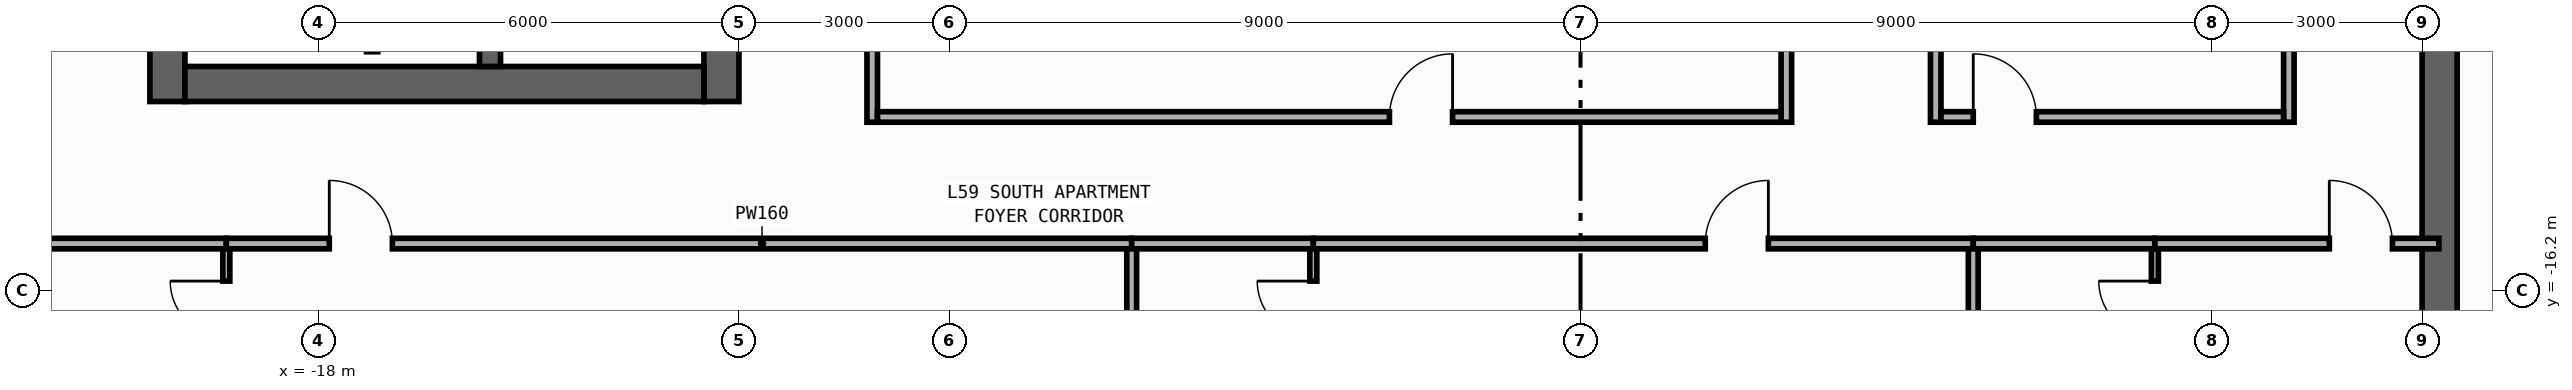
"""IFC4 building model, lengths in metres.
Left out: names, types, materials, properties, quantities, classifications, styles, units other than length and angle.
Written with IfcOpenShell. Run it as: python <this file> out.ifc"""

import sys

from ifc_helpers import new_model, si_unit, direction, frame, frame_2d, origin, place, context, subcontext, project, spatial, rectangle, extrude, element, fill, save


model = new_model("IFC4")
c1 = context("Model", 3, precision=1e-05, world=origin(), true_north=direction((0.0, 1.0)))
c2 = subcontext(c1, "Body", "Model", "MODEL_VIEW")
j1 = project(units=[si_unit("LENGTHUNIT", "METRE"), si_unit("PLANEANGLEUNIT", "RADIAN")], contexts=[c1])
p1 = place(None, origin())
s1 = spatial("IfcSite", under=j1, at=p1, CompositionType="ELEMENT")
p2 = place(p1, origin())
s2 = spatial("IfcBuilding", under=s1, at=p2, CompositionType="ELEMENT")
p3 = place(p2, frame((0.0, 0.0, 251.2)))
s3 = spatial("IfcBuildingStorey", under=s2, at=p3, CompositionType="ELEMENT", Elevation=251.2)
p4 = place(p3, frame((-20.15, -13.5, 0.0), z_axis=(0.0, 0.0, 1.0), x_axis=(0.0, 1.0, 0.0)))
e1 = element("IfcWall", 1, at=p4, inside=s3, PredefinedType="SHEAR", context=c2, shape_type="SweptSolid", body=[
    extrude(rectangle(XDim=27.0, YDim=0.5, at=frame_2d((13.5, 0.0))), origin(), (0.0, 0.0, 1.0), 3.34),
])
p5 = place(p3, frame((-12.25, -13.5, 0.0), z_axis=(0.0, 0.0, 1.0), x_axis=(0.0, 1.0, 0.0)))
e2 = element("IfcWall", 2, at=p5, inside=s3, PredefinedType="SHEAR", context=c2, shape_type="SweptSolid", body=[
    extrude(rectangle(XDim=27.0, YDim=0.5, at=frame_2d((13.5, 0.0))), origin(), (0.0, 0.0, 1.0), 3.34),
])
p6 = place(p5, frame((15.175, 0.0, 0.0)))
e3 = element("IfcOpeningElement", 3, at=p6, cuts=e2, PredefinedType="OPENING", context=c2, shape_type="SweptSolid", body=[
    extrude(rectangle(XDim=0.85, YDim=2.1, at=frame_2d((0.425, 1.05))), frame((0.0, 0.26, 0.0), z_axis=(0.0, -1.0, 0.0), x_axis=(1.0, 0.0, 0.0)), (0.0, 0.0, 1.0), 0.52),
])
p7 = place(p5, frame((21.275, 0.0, 0.0)))
e4 = element("IfcOpeningElement", 4, at=p7, cuts=e2, PredefinedType="OPENING", context=c2, shape_type="SweptSolid", body=[
    extrude(rectangle(XDim=0.85, YDim=2.1, at=frame_2d((0.425, 1.05))), frame((0.0, 0.26, 0.0), z_axis=(0.0, -1.0, 0.0), x_axis=(1.0, 0.0, 0.0)), (0.0, 0.0, 1.0), 0.52),
])
p8 = place(p5, frame((4.275, 0.0, 0.0)))
e5 = element("IfcOpeningElement", 5, at=p8, cuts=e2, PredefinedType="OPENING", context=c2, shape_type="SweptSolid", body=[
    extrude(rectangle(XDim=0.85, YDim=2.1, at=frame_2d((0.425, 1.05))), frame((0.0, 0.26, 0.0), z_axis=(0.0, -1.0, 0.0), x_axis=(1.0, 0.0, 0.0)), (0.0, 0.0, 1.0), 0.52),
])
p9 = place(p5, frame((10.275, 0.0, 0.0)))
e6 = element("IfcOpeningElement", 6, at=p9, cuts=e2, PredefinedType="OPENING", context=c2, shape_type="SweptSolid", body=[
    extrude(rectangle(XDim=0.85, YDim=2.1, at=frame_2d((0.425, 1.05))), frame((0.0, 0.26, 0.0), z_axis=(0.0, -1.0, 0.0), x_axis=(1.0, 0.0, 0.0)), (0.0, 0.0, 1.0), 0.52),
])
p10 = place(p5, frame((12.725, 0.0, 0.0)))
e7 = element("IfcOpeningElement", 7, at=p10, cuts=e2, PredefinedType="OPENING", context=c2, shape_type="SweptSolid", body=[
    extrude(rectangle(XDim=1.15, YDim=2.2, at=frame_2d((0.575, 1.1))), frame((0.0, 0.26, 0.0), z_axis=(0.0, -1.0, 0.0), x_axis=(1.0, 0.0, 0.0)), (0.0, 0.0, 1.0), 0.52),
])
p11 = place(p5, frame((1.625, 0.0, 0.0)))
e8 = element("IfcOpeningElement", 8, at=p11, cuts=e2, PredefinedType="OPENING", context=c2, shape_type="SweptSolid", body=[
    extrude(rectangle(XDim=0.85, YDim=2.1, at=frame_2d((0.425, 1.05))), frame((0.0, 0.26, 0.0), z_axis=(0.0, -1.0, 0.0), x_axis=(1.0, 0.0, 0.0)), (0.0, 0.0, 1.0), 0.52),
])
p12 = place(p3, frame((-19.9, -13.25, 0.0), z_axis=(0.0, 0.0, 1.0), x_axis=(1.0, 0.0, 0.0)))
e9 = element("IfcWall", 9, at=p12, inside=s3, PredefinedType="SHEAR", context=c2, shape_type="SweptSolid", body=[
    extrude(rectangle(XDim=7.4, YDim=0.5, at=frame_2d((3.7, 0.0))), origin(), (0.0, 0.0, 1.0), 3.34),
])
p13 = place(p3, frame((-15.55, -13.0, 0.0), z_axis=(0.0, 0.0, 1.0), x_axis=(0.0, 1.0, 0.0)))
e10 = element("IfcWall", 10, at=p13, inside=s3, PredefinedType="SHEAR", context=c2, shape_type="SweptSolid", body=[
    extrude(rectangle(XDim=26.0, YDim=0.3, at=frame_2d((13.0, 0.0))), origin(), (0.0, 0.0, 1.0), 3.34),
])
p14 = place(p13, frame((12.225, 0.0, 0.0)))
e11 = element("IfcOpeningElement", 11, at=p14, cuts=e10, PredefinedType="OPENING", context=c2, shape_type="SweptSolid", body=[
    extrude(rectangle(XDim=1.15, YDim=2.2, at=frame_2d((0.575, 1.1))), frame((0.0, 0.16, 0.0), z_axis=(0.0, -1.0, 0.0), x_axis=(1.0, 0.0, 0.0)), (0.0, 0.0, 1.0), 0.32),
])
p15 = place(p13, frame((1.125, 0.0, 0.0)))
e12 = element("IfcOpeningElement", 12, at=p15, cuts=e10, PredefinedType="OPENING", context=c2, shape_type="SweptSolid", body=[
    extrude(rectangle(XDim=0.85, YDim=2.1, at=frame_2d((0.425, 1.05))), frame((0.0, 0.16, 0.0), z_axis=(0.0, -1.0, 0.0), x_axis=(1.0, 0.0, 0.0)), (0.0, 0.0, 1.0), 0.32),
])
p16 = place(p3, frame((12.25, -19.8, 0.0), z_axis=(0.0, 0.0, 1.0), x_axis=(0.0, 1.0, 0.0)))
e13 = element("IfcWall", 13, at=p16, inside=s3, PredefinedType="SHEAR", context=c2, shape_type="SweptSolid", body=[
    extrude(rectangle(XDim=27.0, YDim=0.5, at=frame_2d((13.5, 0.0))), origin(), (0.0, 0.0, 1.0), 3.34),
])
p17 = place(p16, frame((23.05, 0.0, 0.0)))
e14 = element("IfcOpeningElement", 14, at=p17, cuts=e13, PredefinedType="OPENING", context=c2, shape_type="SweptSolid", body=[
    extrude(rectangle(XDim=1.1, YDim=2.2, at=frame_2d((0.55, 1.1))), frame((0.0, 0.26, 0.0), z_axis=(0.0, -1.0, 0.0), x_axis=(1.0, 0.0, 0.0)), (0.0, 0.0, 1.0), 0.52),
])
p18 = place(p16, frame((19.85, 0.0, 0.0)))
e15 = element("IfcOpeningElement", 15, at=p18, cuts=e13, PredefinedType="OPENING", context=c2, shape_type="SweptSolid", body=[
    extrude(rectangle(XDim=1.1, YDim=2.2, at=frame_2d((0.55, 1.1))), frame((0.0, 0.26, 0.0), z_axis=(0.0, -1.0, 0.0), x_axis=(1.0, 0.0, 0.0)), (0.0, 0.0, 1.0), 0.52),
])
p19 = place(p16, frame((16.65, 0.0, 0.0)))
e16 = element("IfcOpeningElement", 16, at=p19, cuts=e13, PredefinedType="OPENING", context=c2, shape_type="SweptSolid", body=[
    extrude(rectangle(XDim=1.1, YDim=2.2, at=frame_2d((0.55, 1.1))), frame((0.0, 0.26, 0.0), z_axis=(0.0, -1.0, 0.0), x_axis=(1.0, 0.0, 0.0)), (0.0, 0.0, 1.0), 0.52),
])
p20 = place(p16, frame((10.175, 0.0, 0.0)))
e17 = element("IfcOpeningElement", 17, at=p20, cuts=e13, PredefinedType="OPENING", context=c2, shape_type="SweptSolid", body=[
    extrude(rectangle(XDim=0.85, YDim=2.1, at=frame_2d((0.425, 1.05))), frame((0.0, 0.26, 0.0), z_axis=(0.0, -1.0, 0.0), x_axis=(1.0, 0.0, 0.0)), (0.0, 0.0, 1.0), 0.52),
])
p21 = place(p16, frame((12.725, 0.0, 0.0)))
e18 = element("IfcOpeningElement", 18, at=p21, cuts=e13, PredefinedType="OPENING", context=c2, shape_type="SweptSolid", body=[
    extrude(rectangle(XDim=1.15, YDim=2.2, at=frame_2d((0.575, 1.1))), frame((0.0, 0.26, 0.0), z_axis=(0.0, -1.0, 0.0), x_axis=(1.0, 0.0, 0.0)), (0.0, 0.0, 1.0), 0.52),
])
p22 = place(p16, frame((25.125, 0.0, 0.0)))
e19 = element("IfcOpeningElement", 19, at=p22, cuts=e13, PredefinedType="OPENING", context=c2, shape_type="SweptSolid", body=[
    extrude(rectangle(XDim=0.85, YDim=2.1, at=frame_2d((0.425, 1.05))), frame((0.0, 0.26, 0.0), z_axis=(0.0, -1.0, 0.0), x_axis=(1.0, 0.0, 0.0)), (0.0, 0.0, 1.0), 0.52),
])
p23 = place(p3, frame((-10.1, -13.795, 0.0), z_axis=(0.0, 0.0, 1.0), x_axis=(0.0, 1.0, 0.0)))
e20 = element("IfcWall", 20, at=p23, inside=s3, PredefinedType="PARTITIONING", context=c2, shape_type="SweptSolid", body=[
    extrude(rectangle(XDim=16.605, YDim=0.15, at=frame_2d((8.302, 0.0))), origin(), (0.0, 0.0, 1.0), 3.34),
])
p24 = place(p23, frame((7.954, 0.0, 0.0)))
e21 = element("IfcOpeningElement", 21, at=p24, cuts=e20, PredefinedType="OPENING", context=c2, shape_type="SweptSolid", body=[
    extrude(rectangle(XDim=0.9, YDim=2.15, at=frame_2d((0.45, 1.075))), frame((0.0, 0.085, 0.0), z_axis=(0.0, -1.0, 0.0), x_axis=(1.0, 0.0, 0.0)), (0.0, 0.0, 1.0), 0.17),
])
p25 = place(p3, frame((10.1, -13.795, 0.0), z_axis=(0.0, 0.0, 1.0), x_axis=(0.0, 1.0, 0.0)))
e22 = element("IfcWall", 22, at=p25, inside=s3, PredefinedType="PARTITIONING", context=c2, shape_type="SweptSolid", body=[
    extrude(rectangle(XDim=13.975, YDim=0.15, at=frame_2d((6.987, 0.0))), origin(), (0.0, 0.0, 1.0), 3.34),
])
p26 = place(p25, frame((7.956, 0.0, 0.0)))
e23 = element("IfcOpeningElement", 23, at=p26, cuts=e22, PredefinedType="OPENING", context=c2, shape_type="SweptSolid", body=[
    extrude(rectangle(XDim=0.9, YDim=2.15, at=frame_2d((0.45, 1.075))), frame((0.0, 0.085, 0.0), z_axis=(0.0, -1.0, 0.0), x_axis=(1.0, 0.0, 0.0)), (0.0, 0.0, 1.0), 0.17),
])
p27 = place(p3, frame((2.935, -13.795, 0.0), z_axis=(0.0, 0.0, 1.0), x_axis=(0.0, 1.0, 0.0)))
e24 = element("IfcWall", 24, at=p27, inside=s3, PredefinedType="PARTITIONING", context=c2, shape_type="SweptSolid", body=[
    extrude(rectangle(XDim=16.455, YDim=0.15, at=frame_2d((8.228, 0.0))), origin(), (0.0, 0.0, 1.0), 3.34),
])
p28 = place(p27, frame((7.878, 0.0, 0.0)))
e25 = element("IfcOpeningElement", 25, at=p28, cuts=e24, PredefinedType="OPENING", context=c2, shape_type="SweptSolid", body=[
    extrude(rectangle(XDim=0.9, YDim=2.15, at=frame_2d((0.45, 1.075))), frame((0.0, 0.085, 0.0), z_axis=(0.0, -1.0, 0.0), x_axis=(1.0, 0.0, 0.0)), (0.0, 0.0, 1.0), 0.17),
])
p29 = place(p3, frame((5.065, -13.795, 0.0), z_axis=(0.0, 0.0, 1.0), x_axis=(0.0, 1.0, 0.0)))
e26 = element("IfcWall", 26, at=p29, inside=s3, PredefinedType="PARTITIONING", context=c2, shape_type="SweptSolid", body=[
    extrude(rectangle(XDim=13.815, YDim=0.15, at=frame_2d((6.907, 0.0))), origin(), (0.0, 0.0, 1.0), 2.99),
])
p30 = place(p29, frame((7.982, 0.0, 0.0)))
e27 = element("IfcOpeningElement", 27, at=p30, cuts=e26, PredefinedType="OPENING", context=c2, shape_type="SweptSolid", body=[
    extrude(rectangle(XDim=0.9, YDim=2.15, at=frame_2d((0.45, 1.075))), frame((0.0, 0.085, 0.0), z_axis=(0.0, -1.0, 0.0), x_axis=(1.0, 0.0, 0.0)), (0.0, 0.0, 1.0), 0.17),
])
p31 = place(p3, frame((-21.955, -15.525, 0.0), z_axis=(0.0, 0.0, 1.0), x_axis=(1.0, 0.0, 0.0)))
e28 = element("IfcWall", 28, at=p31, inside=s3, PredefinedType="PARTITIONING", context=c2, shape_type="SweptSolid", body=[
    extrude(rectangle(XDim=2.645, YDim=0.15, at=frame_2d((1.323, 0.0))), origin(), (0.0, 0.0, 1.0), 3.34),
])
p32 = place(p3, frame((-19.31, -15.525, 0.0), z_axis=(0.0, 0.0, 1.0), x_axis=(1.0, 0.0, 0.0)))
e29 = element("IfcWall", 29, at=p32, inside=s3, PredefinedType="PARTITIONING", context=c2, shape_type="SweptSolid", body=[
    extrude(rectangle(XDim=12.91, YDim=0.15, at=frame_2d((6.455, 0.0))), origin(), (0.0, 0.0, 1.0), 3.34),
])
p33 = place(p32, frame((1.468, 0.0, 0.0)))
e30 = element("IfcOpeningElement", 30, at=p33, cuts=e29, PredefinedType="OPENING", context=c2, shape_type="SweptSolid", body=[
    extrude(rectangle(XDim=0.9, YDim=2.15, at=frame_2d((0.45, 1.075))), frame((0.0, 0.085, 0.0), z_axis=(0.0, -1.0, 0.0), x_axis=(1.0, 0.0, 0.0)), (0.0, 0.0, 1.0), 0.17),
])
p34 = place(p3, frame((-6.4, -15.525, 0.0), z_axis=(0.0, 0.0, 1.0), x_axis=(1.0, 0.0, 0.0)))
e31 = element("IfcWall", 31, at=p34, inside=s3, PredefinedType="PARTITIONING", context=c2, shape_type="SweptSolid", body=[
    extrude(rectangle(XDim=2.59, YDim=0.15, at=frame_2d((1.295, 0.0))), origin(), (0.0, 0.0, 1.0), 3.34),
])
p35 = place(p3, frame((-3.81, -15.525, 0.0), z_axis=(0.0, 0.0, 1.0), x_axis=(1.0, 0.0, 0.0)))
e32 = element("IfcWall", 32, at=p35, inside=s3, PredefinedType="PARTITIONING", context=c2, shape_type="SweptSolid", body=[
    extrude(rectangle(XDim=9.41, YDim=0.15, at=frame_2d((4.705, 0.0))), origin(), (0.0, 0.0, 1.0), 3.34),
])
p36 = place(p35, frame((5.588, 0.0, 0.0)))
e33 = element("IfcOpeningElement", 33, at=p36, cuts=e32, PredefinedType="OPENING", context=c2, shape_type="SweptSolid", body=[
    extrude(rectangle(XDim=0.9, YDim=2.15, at=frame_2d((0.45, 1.075))), frame((0.0, 0.085, 0.0), z_axis=(0.0, -1.0, 0.0), x_axis=(1.0, 0.0, 0.0)), (0.0, 0.0, 1.0), 0.17),
])
p37 = place(p3, frame((5.6, -15.525, 0.0), z_axis=(0.0, 0.0, 1.0), x_axis=(1.0, 0.0, 0.0)))
e34 = element("IfcWall", 34, at=p37, inside=s3, PredefinedType="PARTITIONING", context=c2, shape_type="SweptSolid", body=[
    extrude(rectangle(XDim=2.59, YDim=0.15, at=frame_2d((1.295, 0.0))), origin(), (0.0, 0.0, 1.0), 3.34),
])
p38 = place(p3, frame((8.19, -15.525, 0.0), z_axis=(0.0, 0.0, 1.0), x_axis=(1.0, 0.0, 0.0)))
e35 = element("IfcWall", 35, at=p38, inside=s3, PredefinedType="PARTITIONING", context=c2, shape_type="SweptSolid", body=[
    extrude(rectangle(XDim=4.05, YDim=0.15, at=frame_2d((2.025, 0.0))), origin(), (0.0, 0.0, 1.0), 3.34),
])
p39 = place(p38, frame((2.487, 0.0, 0.0)))
e36 = element("IfcOpeningElement", 36, at=p39, cuts=e35, PredefinedType="OPENING", context=c2, shape_type="SweptSolid", body=[
    extrude(rectangle(XDim=0.9, YDim=2.15, at=frame_2d((0.45, 1.075))), frame((0.0, 0.085, 0.0), z_axis=(0.0, -1.0, 0.0), x_axis=(1.0, 0.0, 0.0)), (0.0, 0.0, 1.0), 0.17),
])
p40 = place(p3, frame((-10.025, -13.72, 0.0), z_axis=(0.0, 0.0, 1.0), x_axis=(1.0, 0.0, 0.0)))
e37 = element("IfcWall", 37, at=p40, inside=s3, PredefinedType="PARTITIONING", context=c2, shape_type="SweptSolid", body=[
    extrude(rectangle(XDim=12.885, YDim=0.15, at=frame_2d((6.442, 0.0))), origin(), (0.0, 0.0, 1.0), 3.34),
])
p41 = place(p40, frame((7.3, 0.0, 0.0)))
e38 = element("IfcOpeningElement", 38, at=p41, cuts=e37, PredefinedType="OPENING", context=c2, shape_type="SweptSolid", body=[
    extrude(rectangle(XDim=0.9, YDim=2.15, at=frame_2d((0.45, 1.075))), frame((0.0, 0.085, 0.0), z_axis=(0.0, -1.0, 0.0), x_axis=(1.0, 0.0, 0.0)), (0.0, 0.0, 1.0), 0.17),
])
p42 = place(p3, frame((5.14, -13.72, 0.0), z_axis=(0.0, 0.0, 1.0), x_axis=(1.0, 0.0, 0.0)))
e39 = element("IfcWall", 39, at=p42, inside=s3, PredefinedType="PARTITIONING", context=c2, shape_type="SweptSolid", body=[
    extrude(rectangle(XDim=4.885, YDim=0.15, at=frame_2d((2.442, 0.0))), origin(), (0.0, 0.0, 1.0), 3.34),
])
p43 = place(p42, frame((0.46, 0.0, 0.0)))
e40 = element("IfcOpeningElement", 40, at=p43, cuts=e39, PredefinedType="OPENING", context=c2, shape_type="SweptSolid", body=[
    extrude(rectangle(XDim=0.9, YDim=2.15, at=frame_2d((0.45, 1.075))), frame((0.0, 0.085, 0.0), z_axis=(0.0, -1.0, 0.0), x_axis=(1.0, 0.0, 0.0)), (0.0, 0.0, 1.0), 0.17),
])
p44 = place(p3, frame((-19.31, -18.1, 0.0), z_axis=(0.0, 0.0, 1.0), x_axis=(0.0, 1.0, 0.0)))
e41 = element("IfcWall", 41, at=p44, inside=s3, PredefinedType="PARTITIONING", context=c2, shape_type="SweptSolid", body=[
    extrude(rectangle(XDim=2.5, YDim=0.1, at=frame_2d((1.25, 0.0))), origin(), (0.0, 0.0, 1.0), 3.34),
])
p45 = place(p44, frame((1.24, 0.0, 0.0)))
e42 = element("IfcOpeningElement", 42, at=p45, cuts=e41, PredefinedType="OPENING", context=c2, shape_type="SweptSolid", body=[
    extrude(rectangle(XDim=0.8, YDim=2.1, at=frame_2d((0.4, 1.05))), frame((0.0, 0.06, 0.0), z_axis=(0.0, -1.0, 0.0), x_axis=(1.0, 0.0, 0.0)), (0.0, 0.0, 1.0), 0.12),
])
p46 = place(p3, frame((-6.4, -18.1, 0.0), z_axis=(0.0, 0.0, 1.0), x_axis=(0.0, 1.0, 0.0)))
e43 = element("IfcWall", 43, at=p46, inside=s3, PredefinedType="PARTITIONING", context=c2, shape_type="SweptSolid", body=[
    extrude(rectangle(XDim=2.5, YDim=0.14, at=frame_2d((1.25, 0.0))), origin(), (0.0, 0.0, 1.0), 3.34),
])
p47 = place(p3, frame((-3.81, -18.1, 0.0), z_axis=(0.0, 0.0, 1.0), x_axis=(0.0, 1.0, 0.0)))
e44 = element("IfcWall", 44, at=p47, inside=s3, PredefinedType="PARTITIONING", context=c2, shape_type="SweptSolid", body=[
    extrude(rectangle(XDim=2.5, YDim=0.1, at=frame_2d((1.25, 0.0))), origin(), (0.0, 0.0, 1.0), 3.34),
])
p48 = place(p47, frame((1.24, 0.0, 0.0)))
e45 = element("IfcOpeningElement", 45, at=p48, cuts=e44, PredefinedType="OPENING", context=c2, shape_type="SweptSolid", body=[
    extrude(rectangle(XDim=0.8, YDim=2.1, at=frame_2d((0.4, 1.05))), frame((0.0, 0.06, 0.0), z_axis=(0.0, -1.0, 0.0), x_axis=(1.0, 0.0, 0.0)), (0.0, 0.0, 1.0), 0.12),
])
p49 = place(p3, frame((5.6, -18.1, 0.0), z_axis=(0.0, 0.0, 1.0), x_axis=(0.0, 1.0, 0.0)))
e46 = element("IfcWall", 46, at=p49, inside=s3, PredefinedType="PARTITIONING", context=c2, shape_type="SweptSolid", body=[
    extrude(rectangle(XDim=2.5, YDim=0.14, at=frame_2d((1.25, 0.0))), origin(), (0.0, 0.0, 1.0), 3.34),
])
p50 = place(p3, frame((8.19, -18.1, 0.0), z_axis=(0.0, 0.0, 1.0), x_axis=(0.0, 1.0, 0.0)))
e47 = element("IfcWall", 47, at=p50, inside=s3, PredefinedType="PARTITIONING", context=c2, shape_type="SweptSolid", body=[
    extrude(rectangle(XDim=2.5, YDim=0.1, at=frame_2d((1.25, 0.0))), origin(), (0.0, 0.0, 1.0), 3.34),
])
p51 = place(p50, frame((1.24, 0.0, 0.0)))
e48 = element("IfcOpeningElement", 48, at=p51, cuts=e47, PredefinedType="OPENING", context=c2, shape_type="SweptSolid", body=[
    extrude(rectangle(XDim=0.8, YDim=2.1, at=frame_2d((0.4, 1.05))), frame((0.0, 0.06, 0.0), z_axis=(0.0, -1.0, 0.0), x_axis=(1.0, 0.0, 0.0)), (0.0, 0.0, 1.0), 0.12),
])
p52 = place(p33, origin())
e49 = element("IfcDoor", 49, at=p52, inside=s3, OperationType="SINGLE_SWING_LEFT", PredefinedType="DOOR", context=c2, shape_type="SweptSolid", body=[
    extrude(rectangle(XDim=0.9, YDim=2.15, at=frame_2d((0.45, 1.075))), frame((0.0, 0.025, 0.0), z_axis=(0.0, -1.0, 0.0), x_axis=(1.0, 0.0, 0.0)), (0.0, 0.0, 1.0), 0.05),
])
fill(e30, e49)
p53 = place(p36, origin())
e50 = element("IfcDoor", 50, at=p53, inside=s3, OperationType="SINGLE_SWING_RIGHT", PredefinedType="DOOR", context=c2, shape_type="SweptSolid", body=[
    extrude(rectangle(XDim=0.9, YDim=2.15, at=frame_2d((0.45, 1.075))), frame((0.0, 0.025, 0.0), z_axis=(0.0, -1.0, 0.0), x_axis=(1.0, 0.0, 0.0)), (0.0, 0.0, 1.0), 0.05),
])
fill(e33, e50)
p54 = place(p39, origin())
e51 = element("IfcDoor", 51, at=p54, inside=s3, OperationType="SINGLE_SWING_LEFT", PredefinedType="DOOR", context=c2, shape_type="SweptSolid", body=[
    extrude(rectangle(XDim=0.9, YDim=2.15, at=frame_2d((0.45, 1.075))), frame((0.0, 0.025, 0.0), z_axis=(0.0, -1.0, 0.0), x_axis=(1.0, 0.0, 0.0)), (0.0, 0.0, 1.0), 0.05),
])
fill(e36, e51)
p55 = place(p41, origin())
e52 = element("IfcDoor", 52, at=p55, inside=s3, OperationType="SINGLE_SWING_RIGHT", PredefinedType="DOOR", context=c2, shape_type="SweptSolid", body=[
    extrude(rectangle(XDim=0.9, YDim=2.15, at=frame_2d((0.45, 1.075))), frame((0.0, 0.025, 0.0), z_axis=(0.0, -1.0, 0.0), x_axis=(1.0, 0.0, 0.0)), (0.0, 0.0, 1.0), 0.05),
])
fill(e38, e52)
p56 = place(p43, origin())
e53 = element("IfcDoor", 53, at=p56, inside=s3, OperationType="SINGLE_SWING_LEFT", PredefinedType="DOOR", context=c2, shape_type="SweptSolid", body=[
    extrude(rectangle(XDim=0.9, YDim=2.15, at=frame_2d((0.45, 1.075))), frame((0.0, 0.025, 0.0), z_axis=(0.0, -1.0, 0.0), x_axis=(1.0, 0.0, 0.0)), (0.0, 0.0, 1.0), 0.05),
])
fill(e40, e53)
p57 = place(p45, origin())
e54 = element("IfcDoor", 54, at=p57, inside=s3, OperationType="SINGLE_SWING_RIGHT", PredefinedType="DOOR", context=c2, shape_type="SweptSolid", body=[
    extrude(rectangle(XDim=0.8, YDim=2.1, at=frame_2d((0.4, 1.05))), frame((0.0, 0.025, 0.0), z_axis=(0.0, -1.0, 0.0), x_axis=(1.0, 0.0, 0.0)), (0.0, 0.0, 1.0), 0.05),
])
fill(e42, e54)
p58 = place(p48, origin())
e55 = element("IfcDoor", 55, at=p58, inside=s3, OperationType="SINGLE_SWING_RIGHT", PredefinedType="DOOR", context=c2, shape_type="SweptSolid", body=[
    extrude(rectangle(XDim=0.8, YDim=2.1, at=frame_2d((0.4, 1.05))), frame((0.0, 0.025, 0.0), z_axis=(0.0, -1.0, 0.0), x_axis=(1.0, 0.0, 0.0)), (0.0, 0.0, 1.0), 0.05),
])
fill(e45, e55)
p59 = place(p51, origin())
e56 = element("IfcDoor", 56, at=p59, inside=s3, OperationType="SINGLE_SWING_RIGHT", PredefinedType="DOOR", context=c2, shape_type="SweptSolid", body=[
    extrude(rectangle(XDim=0.8, YDim=2.1, at=frame_2d((0.4, 1.05))), frame((0.0, 0.025, 0.0), z_axis=(0.0, -1.0, 0.0), x_axis=(1.0, 0.0, 0.0)), (0.0, 0.0, 1.0), 0.05),
])
fill(e48, e56)
save(model, sys.argv[1])
